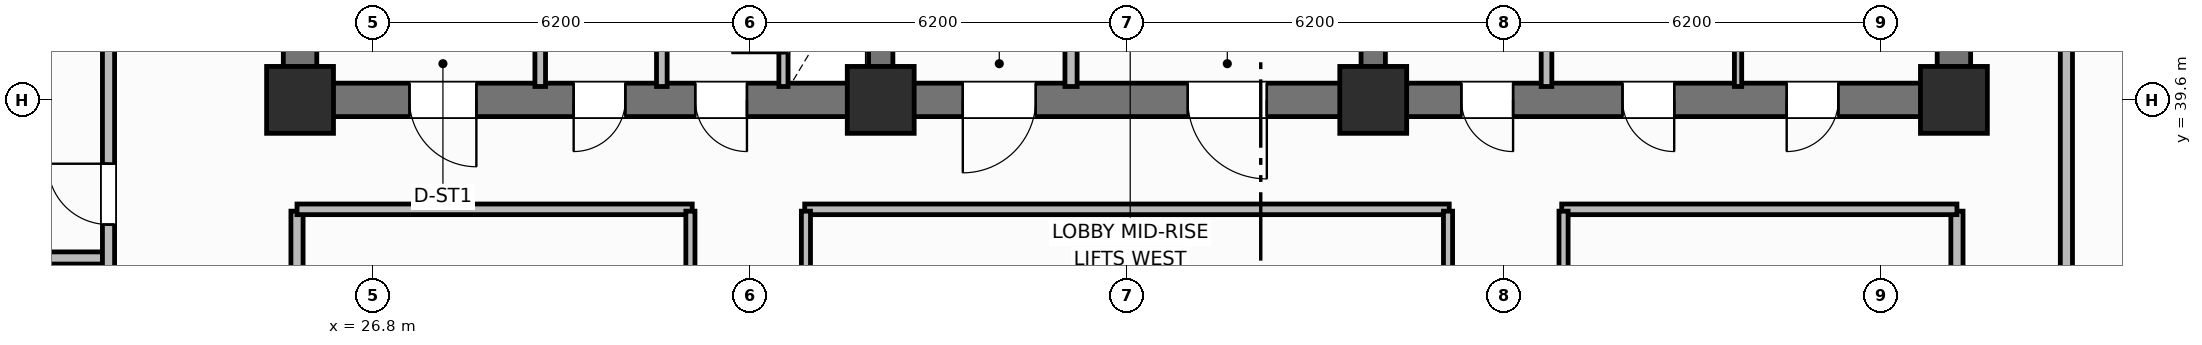
"""IFC4 building model, lengths in metres.
Left out: names, types, materials, properties, quantities, classifications, styles, units other than length and angle.
Written with IfcOpenShell. Run it as: python <this file> out.ifc"""

import sys

from ifc_helpers import new_model, si_unit, direction, frame, frame_2d, origin, origin_2d, place, context, subcontext, project, spatial, rectangle, extrude, element, fill, save


model = new_model("IFC4")
c1 = context("Model", 3, precision=1e-05, world=origin(), true_north=direction((0.0, 1.0)))
c2 = subcontext(c1, "Body", "Model", "MODEL_VIEW")
j1 = project(units=[si_unit("LENGTHUNIT", "METRE"), si_unit("PLANEANGLEUNIT", "RADIAN")], contexts=[c1])
p1 = place(None, origin())
s1 = spatial("IfcSite", under=j1, at=p1, CompositionType="ELEMENT")
p2 = place(p1, origin())
s2 = spatial("IfcBuilding", under=s1, at=p2, CompositionType="ELEMENT")
p3 = place(p2, frame((0.0, 0.0, 99.4)))
s3 = spatial("IfcBuildingStorey", under=s2, at=p3, CompositionType="ELEMENT", Elevation=99.4)
for number, where, z_axis, x_axis in (
    (1, (25.6, 39.875, 0.0), (0.0, 0.0, 1.0), (0.0, 1.0, 0.0)),
    (2, (52.8, 39.875, 0.0), (0.0, 0.0, 1.0), (0.0, 1.0, 0.0)),
):
    element("IfcWall", number, at=place(p3, frame(where, z_axis=z_axis, x_axis=x_axis)), inside=s3, PredefinedType="SHEAR", context=c2, shape_type="SweptSolid", body=[
        extrude(rectangle(XDim=5.65, YDim=0.55, at=frame_2d((2.825, 0.0))), origin(), (0.0, 0.0, 1.0), 3.7),
    ])
p4 = place(p3, frame((52.8, 39.6, 0.0), z_axis=(0.0, 0.0, 1.0), x_axis=(-1.0, 0.0, 0.0)))
e3 = element("IfcWall", 3, at=p4, inside=s3, PredefinedType="SHEAR", context=c2, shape_type="SweptSolid", body=[
    extrude(rectangle(XDim=27.2, YDim=0.55, at=frame_2d((13.6, 0.0))), origin(), (0.0, 0.0, 1.0), 3.7),
])
p5 = place(p4, frame((24.3, 0.0, 0.0)))
e4 = element("IfcOpeningElement", 4, at=p5, cuts=e3, PredefinedType="OPENING", context=c2, shape_type="SweptSolid", body=[
    extrude(rectangle(XDim=1.1, YDim=2.15, at=frame_2d((0.55, 1.075))), frame((0.0, 0.285, 0.0), z_axis=(0.0, -1.0, 0.0), x_axis=(1.0, 0.0, 0.0)), (0.0, 0.0, 1.0), 0.57),
])
p6 = place(p4, frame((21.85, 0.0, 0.0)))
e5 = element("IfcOpeningElement", 5, at=p6, cuts=e3, PredefinedType="OPENING", context=c2, shape_type="SweptSolid", body=[
    extrude(rectangle(XDim=0.85, YDim=2.1, at=frame_2d((0.425, 1.05))), frame((0.0, 0.285, 0.0), z_axis=(0.0, -1.0, 0.0), x_axis=(1.0, 0.0, 0.0)), (0.0, 0.0, 1.0), 0.57),
])
p7 = place(p4, frame((19.85, 0.0, 0.0)))
e6 = element("IfcOpeningElement", 6, at=p7, cuts=e3, PredefinedType="OPENING", context=c2, shape_type="SweptSolid", body=[
    extrude(rectangle(XDim=0.85, YDim=2.1, at=frame_2d((0.425, 1.05))), frame((0.0, 0.285, 0.0), z_axis=(0.0, -1.0, 0.0), x_axis=(1.0, 0.0, 0.0)), (0.0, 0.0, 1.0), 0.57),
])
p8 = place(p4, frame((15.1, 0.0, 0.0)))
e7 = element("IfcOpeningElement", 7, at=p8, cuts=e3, PredefinedType="OPENING", context=c2, shape_type="SweptSolid", body=[
    extrude(rectangle(XDim=1.2, YDim=2.15, at=frame_2d((0.6, 1.075))), frame((0.0, 0.285, 0.0), z_axis=(0.0, -1.0, 0.0), x_axis=(1.0, 0.0, 0.0)), (0.0, 0.0, 1.0), 0.57),
])
p9 = place(p4, frame((11.3, 0.0, 0.0)))
e8 = element("IfcOpeningElement", 8, at=p9, cuts=e3, PredefinedType="OPENING", context=c2, shape_type="SweptSolid", body=[
    extrude(rectangle(XDim=1.3, YDim=2.2, at=frame_2d((0.65, 1.1))), frame((0.0, 0.285, 0.0), z_axis=(0.0, -1.0, 0.0), x_axis=(1.0, 0.0, 0.0)), (0.0, 0.0, 1.0), 0.57),
])
p10 = place(p4, frame((7.25, 0.0, 0.0)))
e9 = element("IfcOpeningElement", 9, at=p10, cuts=e3, PredefinedType="OPENING", context=c2, shape_type="SweptSolid", body=[
    extrude(rectangle(XDim=0.85, YDim=2.1, at=frame_2d((0.425, 1.05))), frame((0.0, 0.285, 0.0), z_axis=(0.0, -1.0, 0.0), x_axis=(1.0, 0.0, 0.0)), (0.0, 0.0, 1.0), 0.57),
])
p11 = place(p4, frame((4.6, 0.0, 0.0)))
e10 = element("IfcOpeningElement", 10, at=p11, cuts=e3, PredefinedType="OPENING", context=c2, shape_type="SweptSolid", body=[
    extrude(rectangle(XDim=0.85, YDim=2.1, at=frame_2d((0.425, 1.05))), frame((0.0, 0.285, 0.0), z_axis=(0.0, -1.0, 0.0), x_axis=(1.0, 0.0, 0.0)), (0.0, 0.0, 1.0), 0.57),
])
p12 = place(p4, frame((1.9, 0.0, 0.0)))
e11 = element("IfcOpeningElement", 11, at=p12, cuts=e3, PredefinedType="OPENING", context=c2, shape_type="SweptSolid", body=[
    extrude(rectangle(XDim=0.85, YDim=2.1, at=frame_2d((0.425, 1.05))), frame((0.0, 0.285, 0.0), z_axis=(0.0, -1.0, 0.0), x_axis=(1.0, 0.0, 0.0)), (0.0, 0.0, 1.0), 0.57),
])
for number, where, z_axis, x_axis in (
    (12, (35.15, 39.875, 0.0), (0.0, 0.0, 1.0), (0.0, 1.0, 0.0)),
    (13, (43.25, 39.875, 0.0), (0.0, 0.0, 1.0), (0.0, 1.0, 0.0)),
):
    element("IfcWall", number, at=place(p3, frame(where, z_axis=z_axis, x_axis=x_axis)), inside=s3, PredefinedType="SHEAR", context=c2, shape_type="SweptSolid", body=[
        extrude(rectangle(XDim=5.65, YDim=0.4, at=frame_2d((2.825, 0.0))), origin(), (0.0, 0.0, 1.0), 3.7),
    ])
for number, where, z_axis, x_axis in (
    (14, (25.6, 39.6, 0.0), (0.0, 0.0, 1.0), (1.0, 0.0, 0.0)),
    (15, (35.15, 39.6, 0.0), (0.0, 0.0, 1.0), (1.0, 0.0, 0.0)),
    (16, (43.25, 39.6, 0.0), (0.0, 0.0, 1.0), (1.0, 0.0, 0.0)),
    (17, (52.8, 39.6, 0.0), (0.0, 0.0, 1.0), (1.0, 0.0, 0.0)),
):
    element("IfcColumn", number, at=place(p3, frame(where, z_axis=z_axis, x_axis=x_axis)), inside=s3, PredefinedType="COLUMN", context=c2, shape_type="SweptSolid", body=[
        extrude(rectangle(XDim=1.1, YDim=1.1, at=origin_2d()), origin(), (0.0, 0.0, 1.0), 3.7),
    ])
p13 = place(p3, frame((33.55, 39.82, 0.0), z_axis=(0.0, 0.0, 1.0), x_axis=(0.0, 1.0, 0.0)))
e18 = element("IfcWall", 18, at=p13, inside=s3, PredefinedType="PARTITIONING", context=c2, shape_type="SweptSolid", body=[
    extrude(rectangle(XDim=2.13, YDim=0.15, at=frame_2d((1.065, 0.0))), origin(), (0.0, 0.0, 1.0), 2.53),
])
p14 = place(p13, frame((0.55, 0.0, 0.0)))
e19 = element("IfcOpeningElement", 19, at=p14, cuts=e18, PredefinedType="OPENING", context=c2, shape_type="SweptSolid", body=[
    extrude(rectangle(XDim=0.85, YDim=2.05, at=frame_2d((0.425, 1.025))), frame((0.0, 0.085, 0.0), z_axis=(0.0, -1.0, 0.0), x_axis=(1.0, 0.0, 0.0)), (0.0, 0.0, 1.0), 0.17),
])
for number, where, z_axis, x_axis in (
    (20, (29.55, 39.82, 0.0), (0.0, 0.0, 1.0), (0.0, 1.0, 0.0)),
    (21, (31.55, 39.82, 0.0), (0.0, 0.0, 1.0), (0.0, 1.0, 0.0)),
):
    element("IfcWall", number, at=place(p3, frame(where, z_axis=z_axis, x_axis=x_axis)), inside=s3, PredefinedType="PARTITIONING", context=c2, shape_type="SweptSolid", body=[
        extrude(rectangle(XDim=2.13, YDim=0.175, at=frame_2d((1.065, 0.0))), origin(), (0.0, 0.0, 1.0), 2.53),
    ])
p15 = place(p3, frame((38.28, 39.82, 0.0), z_axis=(0.0, 0.0, 1.0), x_axis=(0.0, 1.0, 0.0)))
e22 = element("IfcWall", 22, at=p15, inside=s3, PredefinedType="PARTITIONING", context=c2, shape_type="SweptSolid", body=[
    extrude(rectangle(XDim=2.73, YDim=0.2, at=frame_2d((1.365, 0.0))), origin(), (0.0, 0.0, 1.0), 2.53),
])
p16 = place(p3, frame((46.1, 39.82, 0.0), z_axis=(0.0, 0.0, 1.0), x_axis=(0.0, 1.0, 0.0)))
e23 = element("IfcWall", 23, at=p16, inside=s3, PredefinedType="PARTITIONING", context=c2, shape_type="SweptSolid", body=[
    extrude(rectangle(XDim=2.73, YDim=0.175, at=frame_2d((1.365, 0.0))), origin(), (0.0, 0.0, 1.0), 2.53),
])
p17 = place(p3, frame((49.25, 39.82, 0.0), z_axis=(0.0, 0.0, 1.0), x_axis=(0.0, 1.0, 0.0)))
e24 = element("IfcWall", 24, at=p17, inside=s3, PredefinedType="PARTITIONING", context=c2, shape_type="SweptSolid", body=[
    extrude(rectangle(XDim=2.73, YDim=0.12, at=frame_2d((1.365, 0.0))), origin(), (0.0, 0.0, 1.0), 2.53),
])
for number, where, z_axis, x_axis in (
    (25, (25.55, 18.63, 0.0), (0.0, 0.0, 1.0), (0.0, 1.0, 0.0)),
    (26, (52.85, 18.63, 0.0), (0.0, 0.0, 1.0), (0.0, 1.0, 0.0)),
):
    element("IfcWall", number, at=place(p3, frame(where, z_axis=z_axis, x_axis=x_axis)), inside=s3, PredefinedType="PARTITIONING", context=c2, shape_type="SweptSolid", body=[
        extrude(rectangle(XDim=19.14, YDim=0.2, at=frame_2d((9.57, 0.0))), origin(), (0.0, 0.0, 1.0), 2.53),
    ])
p18 = place(p3, frame((25.55, 37.8, 0.0), z_axis=(0.0, 0.0, 1.0), x_axis=(1.0, 0.0, 0.0)))
e27 = element("IfcWall", 27, at=p18, inside=s3, PredefinedType="PARTITIONING", context=c2, shape_type="SweptSolid", body=[
    extrude(rectangle(XDim=6.5, YDim=0.175, at=frame_2d((3.25, 0.0))), origin(), (0.0, 0.0, 1.0), 2.53),
])
p19 = place(p3, frame((33.9, 37.8, 0.0), z_axis=(0.0, 0.0, 1.0), x_axis=(1.0, 0.0, 0.0)))
e28 = element("IfcWall", 28, at=p19, inside=s3, PredefinedType="PARTITIONING", context=c2, shape_type="SweptSolid", body=[
    extrude(rectangle(XDim=10.6, YDim=0.175, at=frame_2d((5.3, 0.0))), origin(), (0.0, 0.0, 1.0), 2.53),
])
p20 = place(p3, frame((46.35, 37.8, 0.0), z_axis=(0.0, 0.0, 1.0), x_axis=(1.0, 0.0, 0.0)))
e29 = element("IfcWall", 29, at=p20, inside=s3, PredefinedType="PARTITIONING", context=c2, shape_type="SweptSolid", body=[
    extrude(rectangle(XDim=6.5, YDim=0.175, at=frame_2d((3.25, 0.0))), origin(), (0.0, 0.0, 1.0), 2.53),
])
p21 = place(p3, frame((32.02, 18.63, 0.0), z_axis=(0.0, 0.0, 1.0), x_axis=(0.0, 1.0, 0.0)))
e30 = element("IfcWall", 30, at=p21, inside=s3, PredefinedType="PARTITIONING", context=c2, shape_type="SweptSolid", body=[
    extrude(rectangle(XDim=19.14, YDim=0.15, at=frame_2d((9.57, 0.0))), origin(), (0.0, 0.0, 1.0), 2.53),
])
p22 = place(p21, frame((3.0, 0.0, 0.0)))
e31 = element("IfcOpeningElement", 31, at=p22, cuts=e30, PredefinedType="OPENING", context=c2, shape_type="SweptSolid", body=[
    extrude(rectangle(XDim=0.9, YDim=2.1, at=frame_2d((0.45, 1.05))), frame((0.0, 0.085, 0.0), z_axis=(0.0, -1.0, 0.0), x_axis=(1.0, 0.0, 0.0)), (0.0, 0.0, 1.0), 0.17),
])
p23 = place(p21, frame((11.5, 0.0, 0.0)))
e32 = element("IfcOpeningElement", 32, at=p23, cuts=e30, PredefinedType="OPENING", context=c2, shape_type="SweptSolid", body=[
    extrude(rectangle(XDim=0.9, YDim=2.1, at=frame_2d((0.45, 1.05))), frame((0.0, 0.085, 0.0), z_axis=(0.0, -1.0, 0.0), x_axis=(1.0, 0.0, 0.0)), (0.0, 0.0, 1.0), 0.17),
])
p24 = place(p3, frame((33.92, 18.63, 0.0), z_axis=(0.0, 0.0, 1.0), x_axis=(0.0, 1.0, 0.0)))
e33 = element("IfcWall", 33, at=p24, inside=s3, PredefinedType="PARTITIONING", context=c2, shape_type="SweptSolid", body=[
    extrude(rectangle(XDim=19.14, YDim=0.15, at=frame_2d((9.57, 0.0))), origin(), (0.0, 0.0, 1.0), 2.53),
])
p25 = place(p24, frame((2.4, 0.0, 0.0)))
e34 = element("IfcOpeningElement", 34, at=p25, cuts=e33, PredefinedType="OPENING", context=c2, shape_type="SweptSolid", body=[
    extrude(rectangle(XDim=0.9, YDim=2.1, at=frame_2d((0.45, 1.05))), frame((0.0, 0.085, 0.0), z_axis=(0.0, -1.0, 0.0), x_axis=(1.0, 0.0, 0.0)), (0.0, 0.0, 1.0), 0.17),
])
p26 = place(p3, frame((44.48, 18.63, 0.0), z_axis=(0.0, 0.0, 1.0), x_axis=(0.0, 1.0, 0.0)))
e35 = element("IfcWall", 35, at=p26, inside=s3, PredefinedType="PARTITIONING", context=c2, shape_type="SweptSolid", body=[
    extrude(rectangle(XDim=19.14, YDim=0.15, at=frame_2d((9.57, 0.0))), origin(), (0.0, 0.0, 1.0), 2.53),
])
p27 = place(p26, frame((9.847, 0.0, 0.0)))
e36 = element("IfcOpeningElement", 36, at=p27, cuts=e35, PredefinedType="OPENING", context=c2, shape_type="SweptSolid", body=[
    extrude(rectangle(XDim=0.9, YDim=2.1, at=frame_2d((0.45, 1.05))), frame((0.0, 0.085, 0.0), z_axis=(0.0, -1.0, 0.0), x_axis=(1.0, 0.0, 0.0)), (0.0, 0.0, 1.0), 0.17),
])
p28 = place(p3, frame((46.38, 18.63, 0.0), z_axis=(0.0, 0.0, 1.0), x_axis=(0.0, 1.0, 0.0)))
e37 = element("IfcWall", 37, at=p28, inside=s3, PredefinedType="PARTITIONING", context=c2, shape_type="SweptSolid", body=[
    extrude(rectangle(XDim=19.14, YDim=0.15, at=frame_2d((9.57, 0.0))), origin(), (0.0, 0.0, 1.0), 2.53),
])
p29 = place(p28, frame((5.5, 0.0, 0.0)))
e38 = element("IfcOpeningElement", 38, at=p29, cuts=e37, PredefinedType="OPENING", context=c2, shape_type="SweptSolid", body=[
    extrude(rectangle(XDim=1.0, YDim=2.15, at=frame_2d((0.5, 1.075))), frame((0.0, 0.085, 0.0), z_axis=(0.0, -1.0, 0.0), x_axis=(1.0, 0.0, 0.0)), (0.0, 0.0, 1.0), 0.17),
])
p30 = place(p3, frame((14.57, 37.0, 0.0), z_axis=(0.0, 0.0, 1.0), x_axis=(1.0, 0.0, 0.0)))
e39 = element("IfcWall", 39, at=p30, inside=s3, PredefinedType="PARTITIONING", context=c2, shape_type="SweptSolid", body=[
    extrude(rectangle(XDim=7.88, YDim=0.2, at=frame_2d((3.94, 0.0))), origin(), (0.0, 0.0, 1.0), 2.53),
])
p31 = place(p3, frame((22.45, 10.6, 0.0), z_axis=(0.0, 0.0, 1.0), x_axis=(0.0, 1.0, 0.0)))
e40 = element("IfcWall", 40, at=p31, inside=s3, PredefinedType="PARTITIONING", context=c2, shape_type="SweptSolid", body=[
    extrude(rectangle(XDim=35.2, YDim=0.2, at=frame_2d((17.6, 0.0))), origin(), (0.0, 0.0, 1.0), 2.53),
])
p32 = place(p31, frame((2.65, 0.0, 0.0)))
e41 = element("IfcOpeningElement", 41, at=p32, cuts=e40, PredefinedType="OPENING", context=c2, shape_type="SweptSolid", body=[
    extrude(rectangle(XDim=1.0, YDim=2.15, at=frame_2d((0.5, 1.075))), frame((0.0, 0.11, 0.0), z_axis=(0.0, -1.0, 0.0), x_axis=(1.0, 0.0, 0.0)), (0.0, 0.0, 1.0), 0.22),
])
p33 = place(p31, frame((10.81, 0.0, 0.0)))
e42 = element("IfcOpeningElement", 42, at=p33, cuts=e40, PredefinedType="OPENING", context=c2, shape_type="SweptSolid", body=[
    extrude(rectangle(XDim=1.0, YDim=2.15, at=frame_2d((0.5, 1.075))), frame((0.0, 0.11, 0.0), z_axis=(0.0, -1.0, 0.0), x_axis=(1.0, 0.0, 0.0)), (0.0, 0.0, 1.0), 0.22),
])
p34 = place(p31, frame((19.54, 0.0, 0.0)))
e43 = element("IfcOpeningElement", 43, at=p34, cuts=e40, PredefinedType="OPENING", context=c2, shape_type="SweptSolid", body=[
    extrude(rectangle(XDim=1.0, YDim=2.15, at=frame_2d((0.5, 1.075))), frame((0.0, 0.11, 0.0), z_axis=(0.0, -1.0, 0.0), x_axis=(1.0, 0.0, 0.0)), (0.0, 0.0, 1.0), 0.22),
])
p35 = place(p31, frame((26.95, 0.0, 0.0)))
e44 = element("IfcOpeningElement", 44, at=p35, cuts=e40, PredefinedType="OPENING", context=c2, shape_type="SweptSolid", body=[
    extrude(rectangle(XDim=1.0, YDim=2.15, at=frame_2d((0.5, 1.075))), frame((0.0, 0.11, 0.0), z_axis=(0.0, -1.0, 0.0), x_axis=(1.0, 0.0, 0.0)), (0.0, 0.0, 1.0), 0.22),
])
p36 = place(p3, frame((54.65, 10.6, 0.0), z_axis=(0.0, 0.0, 1.0), x_axis=(0.0, 1.0, 0.0)))
e45 = element("IfcWall", 45, at=p36, inside=s3, PredefinedType="PARTITIONING", context=c2, shape_type="SweptSolid", body=[
    extrude(rectangle(XDim=35.2, YDim=0.2, at=frame_2d((17.6, 0.0))), origin(), (0.0, 0.0, 1.0), 2.53),
])
p37 = place(p36, frame((2.65, 0.0, 0.0)))
e46 = element("IfcOpeningElement", 46, at=p37, cuts=e45, PredefinedType="OPENING", context=c2, shape_type="SweptSolid", body=[
    extrude(rectangle(XDim=1.0, YDim=2.15, at=frame_2d((0.5, 1.075))), frame((0.0, 0.11, 0.0), z_axis=(0.0, -1.0, 0.0), x_axis=(1.0, 0.0, 0.0)), (0.0, 0.0, 1.0), 0.22),
])
p38 = place(p36, frame((19.95, 0.0, 0.0)))
e47 = element("IfcOpeningElement", 47, at=p38, cuts=e45, PredefinedType="OPENING", context=c2, shape_type="SweptSolid", body=[
    extrude(rectangle(XDim=1.0, YDim=2.15, at=frame_2d((0.5, 1.075))), frame((0.0, 0.11, 0.0), z_axis=(0.0, -1.0, 0.0), x_axis=(1.0, 0.0, 0.0)), (0.0, 0.0, 1.0), 0.22),
])
p39 = place(p14, origin())
e48 = element("IfcDoor", 48, at=p39, inside=s3, OperationType="SINGLE_SWING_LEFT", PredefinedType="TRAPDOOR", context=c2, shape_type="SweptSolid", body=[
    extrude(rectangle(XDim=0.85, YDim=2.05, at=frame_2d((0.425, 1.025))), frame((0.0, 0.025, 0.0), z_axis=(0.0, -1.0, 0.0), x_axis=(1.0, 0.0, 0.0)), (0.0, 0.0, 1.0), 0.05),
])
fill(e19, e48)
p40 = place(p35, origin())
e49 = element("IfcDoor", 49, at=p40, inside=s3, OperationType="SINGLE_SWING_RIGHT", PredefinedType="DOOR", context=c2, shape_type="SweptSolid", body=[
    extrude(rectangle(XDim=1.0, YDim=2.15, at=frame_2d((0.5, 1.075))), frame((0.0, 0.025, 0.0), z_axis=(0.0, -1.0, 0.0), x_axis=(1.0, 0.0, 0.0)), (0.0, 0.0, 1.0), 0.05),
])
fill(e44, e49)
p41 = place(p5, origin())
e50 = element("IfcDoor", 50, at=p41, inside=s3, OperationType="SINGLE_SWING_LEFT", PredefinedType="DOOR", context=c2, shape_type="SweptSolid", body=[
    extrude(rectangle(XDim=1.1, YDim=2.15, at=frame_2d((0.55, 1.075))), frame((0.0, 0.025, 0.0), z_axis=(0.0, -1.0, 0.0), x_axis=(1.0, 0.0, 0.0)), (0.0, 0.0, 1.0), 0.05),
])
fill(e4, e50)
p42 = place(p6, origin())
e51 = element("IfcDoor", 51, at=p42, inside=s3, OperationType="SINGLE_SWING_RIGHT", PredefinedType="DOOR", context=c2, shape_type="SweptSolid", body=[
    extrude(rectangle(XDim=0.85, YDim=2.1, at=frame_2d((0.425, 1.05))), frame((0.0, 0.025, 0.0), z_axis=(0.0, -1.0, 0.0), x_axis=(1.0, 0.0, 0.0)), (0.0, 0.0, 1.0), 0.05),
])
fill(e5, e51)
p43 = place(p7, origin())
e52 = element("IfcDoor", 52, at=p43, inside=s3, OperationType="SINGLE_SWING_LEFT", PredefinedType="DOOR", context=c2, shape_type="SweptSolid", body=[
    extrude(rectangle(XDim=0.85, YDim=2.1, at=frame_2d((0.425, 1.05))), frame((0.0, 0.025, 0.0), z_axis=(0.0, -1.0, 0.0), x_axis=(1.0, 0.0, 0.0)), (0.0, 0.0, 1.0), 0.05),
])
fill(e6, e52)
p44 = place(p8, origin())
e53 = element("IfcDoor", 53, at=p44, inside=s3, OperationType="SINGLE_SWING_RIGHT", PredefinedType="DOOR", context=c2, shape_type="SweptSolid", body=[
    extrude(rectangle(XDim=1.2, YDim=2.15, at=frame_2d((0.6, 1.075))), frame((0.0, 0.025, 0.0), z_axis=(0.0, -1.0, 0.0), x_axis=(1.0, 0.0, 0.0)), (0.0, 0.0, 1.0), 0.05),
])
fill(e7, e53)
p45 = place(p9, origin())
e54 = element("IfcDoor", 54, at=p45, inside=s3, OperationType="SINGLE_SWING_LEFT", PredefinedType="DOOR", context=c2, shape_type="SweptSolid", body=[
    extrude(rectangle(XDim=1.3, YDim=2.2, at=frame_2d((0.65, 1.1))), frame((0.0, 0.025, 0.0), z_axis=(0.0, -1.0, 0.0), x_axis=(1.0, 0.0, 0.0)), (0.0, 0.0, 1.0), 0.05),
])
fill(e8, e54)
p46 = place(p10, origin())
e55 = element("IfcDoor", 55, at=p46, inside=s3, OperationType="SINGLE_SWING_LEFT", PredefinedType="DOOR", context=c2, shape_type="SweptSolid", body=[
    extrude(rectangle(XDim=0.85, YDim=2.1, at=frame_2d((0.425, 1.05))), frame((0.0, 0.025, 0.0), z_axis=(0.0, -1.0, 0.0), x_axis=(1.0, 0.0, 0.0)), (0.0, 0.0, 1.0), 0.05),
])
fill(e9, e55)
p47 = place(p11, origin())
e56 = element("IfcDoor", 56, at=p47, inside=s3, OperationType="SINGLE_SWING_LEFT", PredefinedType="DOOR", context=c2, shape_type="SweptSolid", body=[
    extrude(rectangle(XDim=0.85, YDim=2.1, at=frame_2d((0.425, 1.05))), frame((0.0, 0.025, 0.0), z_axis=(0.0, -1.0, 0.0), x_axis=(1.0, 0.0, 0.0)), (0.0, 0.0, 1.0), 0.05),
])
fill(e10, e56)
p48 = place(p12, origin())
e57 = element("IfcDoor", 57, at=p48, inside=s3, OperationType="SINGLE_SWING_RIGHT", PredefinedType="DOOR", context=c2, shape_type="SweptSolid", body=[
    extrude(rectangle(XDim=0.85, YDim=2.1, at=frame_2d((0.425, 1.05))), frame((0.0, 0.025, 0.0), z_axis=(0.0, -1.0, 0.0), x_axis=(1.0, 0.0, 0.0)), (0.0, 0.0, 1.0), 0.05),
])
fill(e11, e57)
save(model, sys.argv[1])
